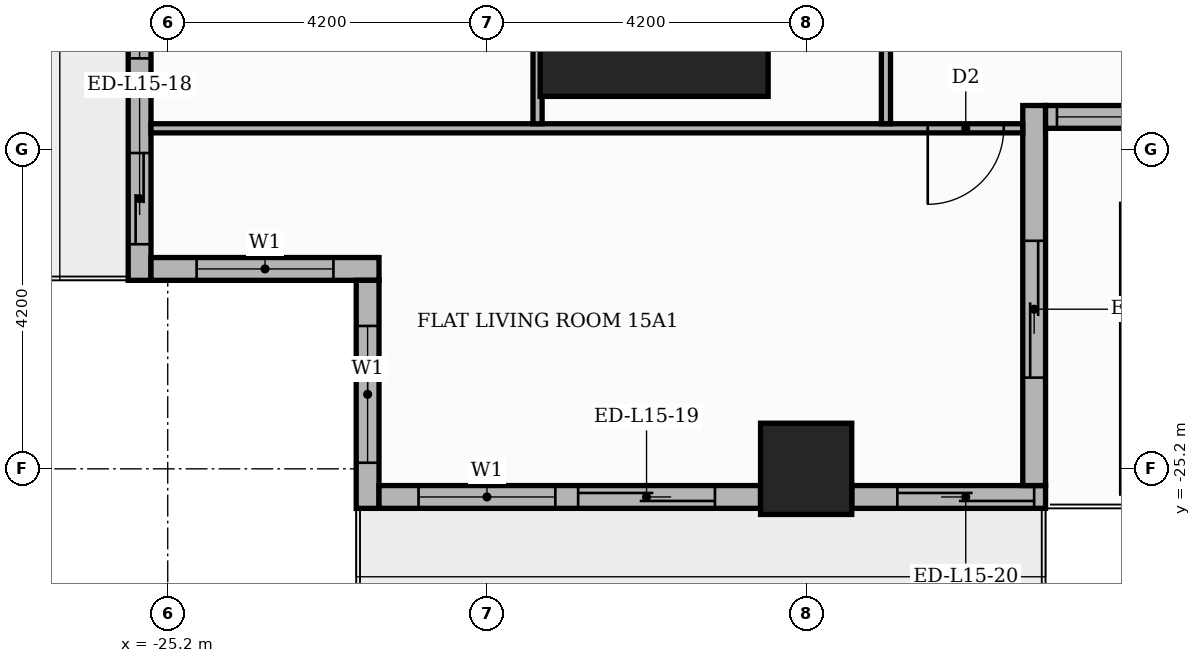
"""IFC4 building model, lengths in metres.
Left out: names, types, materials, properties, quantities, classifications, styles, units other than length and angle.
Written with IfcOpenShell. Run it as: python <this file> out.ifc"""

import sys

from ifc_helpers import new_model, si_unit, direction, frame, frame_2d, origin, origin_2d, place, context, subcontext, project, spatial, rectangle, extrude, element, fill, save


model = new_model("IFC4")
c1 = context("Model", 3, precision=1e-05, world=origin(), true_north=direction((0.0, 1.0)))
c2 = subcontext(c1, "Body", "Model", "MODEL_VIEW")
j1 = project(units=[si_unit("LENGTHUNIT", "METRE"), si_unit("PLANEANGLEUNIT", "RADIAN")], contexts=[c1])
p1 = place(None, origin())
s1 = spatial("IfcSite", under=j1, at=p1, CompositionType="ELEMENT")
p2 = place(p1, origin())
s2 = spatial("IfcBuilding", under=s1, at=p2, CompositionType="ELEMENT")
p3 = place(p2, frame((0.0, 0.0, 66.0)))
s3 = spatial("IfcBuildingStorey", under=s2, at=p3, CompositionType="ELEMENT", Elevation=66.0)
p4 = place(p3, frame((-18.8, -18.8, 0.0), z_axis=(0.0, 0.0, 1.0), x_axis=(1.0, 0.0, 0.0)))
e1 = element("IfcColumn", 1, at=p4, inside=s3, PredefinedType="COLUMN", context=c2, shape_type="SweptSolid", body=[
    extrude(rectangle(XDim=3.0, YDim=3.0, at=origin_2d()), origin(), (0.0, 0.0, 1.0), 3.9),
])
p5 = place(p3, frame((-16.8, -25.2, 0.0), z_axis=(0.0, 0.0, 1.0), x_axis=(1.0, 0.0, 0.0)))
e2 = element("IfcColumn", 2, at=p5, inside=s3, PredefinedType="COLUMN", context=c2, shape_type="SweptSolid", body=[
    extrude(rectangle(XDim=1.2, YDim=1.2, at=origin_2d()), origin(), (0.0, 0.0, 1.0), 3.9),
])
p6 = place(p3, frame((-25.57, -17.4, 0.0), z_axis=(0.0, 0.0, 1.0), x_axis=(0.0, -1.0, 0.0)))
e3 = element("IfcWall", 3, at=p6, inside=s3, PredefinedType="STANDARD", context=c2, shape_type="SweptSolid", body=[
    extrude(rectangle(XDim=5.32, YDim=0.3, at=frame_2d((2.66, 0.0))), origin(), (0.0, 0.0, 1.0), 3.48),
])
p7 = place(p6, frame((0.6, 0.0, 0.9)))
e4 = element("IfcOpeningElement", 4, at=p7, cuts=e3, PredefinedType="OPENING", context=c2, shape_type="SweptSolid", body=[
    extrude(rectangle(XDim=1.8, YDim=2.1, at=frame_2d((0.9, 1.05))), frame((0.0, 0.16, 0.0), z_axis=(0.0, -1.0, 0.0), x_axis=(1.0, 0.0, 0.0)), (0.0, 0.0, 1.0), 0.32),
])
p8 = place(p6, frame((3.645, 0.0, 0.0)))
e5 = element("IfcOpeningElement", 5, at=p8, cuts=e3, PredefinedType="OPENING", context=c2, shape_type="SweptSolid", body=[
    extrude(rectangle(XDim=1.2, YDim=2.4, at=frame_2d((0.6, 1.2))), frame((0.0, 0.16, 0.0), z_axis=(0.0, -1.0, 0.0), x_axis=(1.0, 0.0, 0.0)), (0.0, 0.0, 1.0), 0.32),
])
p9 = place(p3, frame((-25.42, -22.57, 0.0), z_axis=(0.0, 0.0, 1.0), x_axis=(1.0, 0.0, 0.0)))
e6 = element("IfcWall", 6, at=p9, inside=s3, PredefinedType="STANDARD", context=c2, shape_type="SweptSolid", body=[
    extrude(rectangle(XDim=3.0, YDim=0.3, at=frame_2d((1.5, 0.0))), origin(), (0.0, 0.0, 1.0), 3.48),
])
p10 = place(p9, frame((0.6, 0.0, 0.9)))
e7 = element("IfcOpeningElement", 7, at=p10, cuts=e6, PredefinedType="OPENING", context=c2, shape_type="SweptSolid", body=[
    extrude(rectangle(XDim=1.8, YDim=2.1, at=frame_2d((0.9, 1.05))), frame((0.0, 0.16, 0.0), z_axis=(0.0, -1.0, 0.0), x_axis=(1.0, 0.0, 0.0)), (0.0, 0.0, 1.0), 0.32),
])
p11 = place(p3, frame((-22.57, -22.72, 0.0), z_axis=(0.0, 0.0, 1.0), x_axis=(0.0, -1.0, 0.0)))
e8 = element("IfcWall", 8, at=p11, inside=s3, PredefinedType="STANDARD", context=c2, shape_type="SweptSolid", body=[
    extrude(rectangle(XDim=3.0, YDim=0.3, at=frame_2d((1.5, 0.0))), origin(), (0.0, 0.0, 1.0), 3.48),
])
p12 = place(p11, frame((0.6, 0.0, 0.9)))
e9 = element("IfcOpeningElement", 9, at=p12, cuts=e8, PredefinedType="OPENING", context=c2, shape_type="SweptSolid", body=[
    extrude(rectangle(XDim=1.8, YDim=2.1, at=frame_2d((0.9, 1.05))), frame((0.0, 0.16, 0.0), z_axis=(0.0, -1.0, 0.0), x_axis=(1.0, 0.0, 0.0)), (0.0, 0.0, 1.0), 0.32),
])
p13 = place(p3, frame((-22.42, -25.57, 0.0), z_axis=(0.0, 0.0, 1.0), x_axis=(1.0, 0.0, 0.0)))
e10 = element("IfcWall", 10, at=p13, inside=s3, PredefinedType="STANDARD", context=c2, shape_type="SweptSolid", body=[
    extrude(rectangle(XDim=5.02, YDim=0.3, at=frame_2d((2.51, 0.0))), origin(), (0.0, 0.0, 1.0), 3.48),
])
p14 = place(p13, frame((0.52, 0.0, 0.9)))
e11 = element("IfcOpeningElement", 11, at=p14, cuts=e10, PredefinedType="OPENING", context=c2, shape_type="SweptSolid", body=[
    extrude(rectangle(XDim=1.8, YDim=2.1, at=frame_2d((0.9, 1.05))), frame((0.0, 0.16, 0.0), z_axis=(0.0, -1.0, 0.0), x_axis=(1.0, 0.0, 0.0)), (0.0, 0.0, 1.0), 0.32),
])
p15 = place(p13, frame((2.62, 0.0, 0.0)))
e12 = element("IfcOpeningElement", 12, at=p15, cuts=e10, PredefinedType="OPENING", context=c2, shape_type="SweptSolid", body=[
    extrude(rectangle(XDim=1.8, YDim=2.4, at=frame_2d((0.9, 1.2))), frame((0.0, 0.16, 0.0), z_axis=(0.0, -1.0, 0.0), x_axis=(1.0, 0.0, 0.0)), (0.0, 0.0, 1.0), 0.32),
])
p16 = place(p3, frame((-16.2, -25.57, 0.0), z_axis=(0.0, 0.0, 1.0), x_axis=(1.0, 0.0, 0.0)))
e13 = element("IfcWall", 13, at=p16, inside=s3, PredefinedType="STANDARD", context=c2, shape_type="SweptSolid", body=[
    extrude(rectangle(XDim=2.55, YDim=0.3, at=frame_2d((1.275, 0.0))), origin(), (0.0, 0.0, 1.0), 3.48),
])
p17 = place(p16, frame((0.6, 0.0, 0.0)))
e14 = element("IfcOpeningElement", 14, at=p17, cuts=e13, PredefinedType="OPENING", context=c2, shape_type="SweptSolid", body=[
    extrude(rectangle(XDim=1.8, YDim=2.4, at=frame_2d((0.9, 1.2))), frame((0.0, 0.16, 0.0), z_axis=(0.0, -1.0, 0.0), x_axis=(1.0, 0.0, 0.0)), (0.0, 0.0, 1.0), 0.32),
])
p18 = place(p3, frame((-13.8, -25.42, 0.0), z_axis=(0.0, 0.0, 1.0), x_axis=(0.0, 1.0, 0.0)))
e15 = element("IfcWall", 15, at=p18, inside=s3, PredefinedType="STANDARD", context=c2, shape_type="SweptSolid", body=[
    extrude(rectangle(XDim=5.0, YDim=0.3, at=frame_2d((2.5, 0.0))), origin(), (0.0, 0.0, 1.0), 3.48),
])
p19 = place(p18, frame((1.42, 0.0, 0.0)))
e16 = element("IfcOpeningElement", 16, at=p19, cuts=e15, PredefinedType="OPENING", context=c2, shape_type="SweptSolid", body=[
    extrude(rectangle(XDim=1.8, YDim=2.4, at=frame_2d((0.9, 1.2))), frame((0.0, 0.16, 0.0), z_axis=(0.0, -1.0, 0.0), x_axis=(1.0, 0.0, 0.0)), (0.0, 0.0, 1.0), 0.32),
])
p20 = place(p3, frame((-13.65, -20.57, 0.0), z_axis=(0.0, 0.0, 1.0), x_axis=(1.0, 0.0, 0.0)))
e17 = element("IfcWall", 17, at=p20, inside=s3, PredefinedType="STANDARD", context=c2, shape_type="SweptSolid", body=[
    extrude(rectangle(XDim=27.6, YDim=0.3, at=frame_2d((13.8, 0.0))), origin(), (0.0, 0.0, 1.0), 3.48),
])
p21 = place(p20, frame((0.15, 0.0, 0.9)))
e18 = element("IfcOpeningElement", 18, at=p21, cuts=e17, PredefinedType="OPENING", context=c2, shape_type="SweptSolid", body=[
    extrude(rectangle(XDim=6.0, YDim=2.1, at=frame_2d((3.0, 1.05))), frame((0.0, 0.16, 0.0), z_axis=(0.0, -1.0, 0.0), x_axis=(1.0, 0.0, 0.0)), (0.0, 0.0, 1.0), 0.32),
])
p22 = place(p20, frame((6.45, 0.0, 0.9)))
e19 = element("IfcOpeningElement", 19, at=p22, cuts=e17, PredefinedType="OPENING", context=c2, shape_type="SweptSolid", body=[
    extrude(rectangle(XDim=1.8, YDim=2.1, at=frame_2d((0.9, 1.05))), frame((0.0, 0.16, 0.0), z_axis=(0.0, -1.0, 0.0), x_axis=(1.0, 0.0, 0.0)), (0.0, 0.0, 1.0), 0.32),
])
p23 = place(p20, frame((8.55, 0.0, 0.9)))
e20 = element("IfcOpeningElement", 20, at=p23, cuts=e17, PredefinedType="OPENING", context=c2, shape_type="SweptSolid", body=[
    extrude(rectangle(XDim=6.0, YDim=2.1, at=frame_2d((3.0, 1.05))), frame((0.0, 0.16, 0.0), z_axis=(0.0, -1.0, 0.0), x_axis=(1.0, 0.0, 0.0)), (0.0, 0.0, 1.0), 0.32),
])
p24 = place(p20, frame((14.85, 0.0, 0.9)))
e21 = element("IfcOpeningElement", 21, at=p24, cuts=e17, PredefinedType="OPENING", context=c2, shape_type="SweptSolid", body=[
    extrude(rectangle(XDim=6.0, YDim=2.1, at=frame_2d((3.0, 1.05))), frame((0.0, 0.16, 0.0), z_axis=(0.0, -1.0, 0.0), x_axis=(1.0, 0.0, 0.0)), (0.0, 0.0, 1.0), 0.32),
])
p25 = place(p20, frame((21.15, 0.0, 0.9)))
e22 = element("IfcOpeningElement", 22, at=p25, cuts=e17, PredefinedType="OPENING", context=c2, shape_type="SweptSolid", body=[
    extrude(rectangle(XDim=6.0, YDim=2.1, at=frame_2d((3.0, 1.05))), frame((0.0, 0.16, 0.0), z_axis=(0.0, -1.0, 0.0), x_axis=(1.0, 0.0, 0.0)), (0.0, 0.0, 1.0), 0.32),
])
p26 = place(p3, frame((-25.42, -20.72, 0.0), z_axis=(0.0, 0.0, 1.0), x_axis=(1.0, 0.0, 0.0)))
e23 = element("IfcWall", 23, at=p26, inside=s3, PredefinedType="PARTITIONING", context=c2, shape_type="SweptSolid", body=[
    extrude(rectangle(XDim=11.47, YDim=0.12, at=frame_2d((5.735, 0.0))), origin(), (0.0, 0.0, 1.0), 3.48),
])
p27 = place(p26, frame((10.22, 0.0, 0.0)))
e24 = element("IfcOpeningElement", 24, at=p27, cuts=e23, PredefinedType="OPENING", context=c2, shape_type="SweptSolid", body=[
    extrude(rectangle(XDim=1.0, YDim=2.1, at=frame_2d((0.5, 1.05))), frame((0.0, 0.07, 0.0), z_axis=(0.0, -1.0, 0.0), x_axis=(1.0, 0.0, 0.0)), (0.0, 0.0, 1.0), 0.14),
])
p28 = place(p3, frame((-20.334, -20.66, 0.0), z_axis=(0.0, 0.0, 1.0), x_axis=(0.0, 1.0, 0.0)))
e25 = element("IfcWall", 25, at=p28, inside=s3, PredefinedType="PARTITIONING", context=c2, shape_type="SweptSolid", body=[
    extrude(rectangle(XDim=6.91, YDim=0.12, at=frame_2d((3.455, 0.0))), origin(), (0.0, 0.0, 1.0), 3.48),
])
p29 = place(p28, frame((4.792, 0.0, 0.0)))
e26 = element("IfcOpeningElement", 26, at=p29, cuts=e25, PredefinedType="OPENING", context=c2, shape_type="SweptSolid", body=[
    extrude(rectangle(XDim=0.9, YDim=2.1, at=frame_2d((0.45, 1.05))), frame((0.0, 0.07, 0.0), z_axis=(0.0, -1.0, 0.0), x_axis=(1.0, 0.0, 0.0)), (0.0, 0.0, 1.0), 0.14),
])
p30 = place(p3, frame((-15.75, -20.66, 0.0), z_axis=(0.0, 0.0, 1.0), x_axis=(0.0, 1.0, 0.0)))
e27 = element("IfcWall", 27, at=p30, inside=s3, PredefinedType="PARTITIONING", context=c2, shape_type="SweptSolid", body=[
    extrude(rectangle(XDim=6.91, YDim=0.12, at=frame_2d((3.455, 0.0))), origin(), (0.0, 0.0, 1.0), 3.48),
])
p31 = place(p30, frame((2.975, 0.0, 0.0)))
e28 = element("IfcOpeningElement", 28, at=p31, cuts=e27, PredefinedType="OPENING", context=c2, shape_type="SweptSolid", body=[
    extrude(rectangle(XDim=1.0, YDim=2.1, at=frame_2d((0.5, 1.05))), frame((0.0, 0.07, 0.0), z_axis=(0.0, -1.0, 0.0), x_axis=(1.0, 0.0, 0.0)), (0.0, 0.0, 1.0), 0.14),
])
p32 = place(p7, origin())
e29 = element("IfcWindow", 29, at=p32, inside=s3, PartitioningType="SINGLE_PANEL", PredefinedType="WINDOW", context=c2, shape_type="SweptSolid", body=[
    extrude(rectangle(XDim=1.8, YDim=2.1, at=frame_2d((0.9, 1.05))), frame((0.0, 0.03, 0.0), z_axis=(0.0, -1.0, 0.0), x_axis=(1.0, 0.0, 0.0)), (0.0, 0.0, 1.0), 0.06),
])
fill(e4, e29)
p33 = place(p8, origin())
e30 = element("IfcDoor", 30, at=p33, inside=s3, OperationType="SLIDING_TO_RIGHT", PredefinedType="DOOR", context=c2, shape_type="SweptSolid", body=[
    extrude(rectangle(XDim=1.2, YDim=2.4, at=frame_2d((0.6, 1.2))), frame((0.0, 0.025, 0.0), z_axis=(0.0, -1.0, 0.0), x_axis=(1.0, 0.0, 0.0)), (0.0, 0.0, 1.0), 0.05),
])
fill(e5, e30)
p34 = place(p10, origin())
e31 = element("IfcWindow", 31, at=p34, inside=s3, PartitioningType="SINGLE_PANEL", PredefinedType="WINDOW", context=c2, shape_type="SweptSolid", body=[
    extrude(rectangle(XDim=1.8, YDim=2.1, at=frame_2d((0.9, 1.05))), frame((0.0, 0.03, 0.0), z_axis=(0.0, -1.0, 0.0), x_axis=(1.0, 0.0, 0.0)), (0.0, 0.0, 1.0), 0.06),
])
fill(e7, e31)
p35 = place(p12, origin())
e32 = element("IfcWindow", 32, at=p35, inside=s3, PartitioningType="SINGLE_PANEL", PredefinedType="WINDOW", context=c2, shape_type="SweptSolid", body=[
    extrude(rectangle(XDim=1.8, YDim=2.1, at=frame_2d((0.9, 1.05))), frame((0.0, 0.03, 0.0), z_axis=(0.0, -1.0, 0.0), x_axis=(1.0, 0.0, 0.0)), (0.0, 0.0, 1.0), 0.06),
])
fill(e9, e32)
p36 = place(p14, origin())
e33 = element("IfcWindow", 33, at=p36, inside=s3, PartitioningType="SINGLE_PANEL", PredefinedType="WINDOW", context=c2, shape_type="SweptSolid", body=[
    extrude(rectangle(XDim=1.8, YDim=2.1, at=frame_2d((0.9, 1.05))), frame((0.0, 0.03, 0.0), z_axis=(0.0, -1.0, 0.0), x_axis=(1.0, 0.0, 0.0)), (0.0, 0.0, 1.0), 0.06),
])
fill(e11, e33)
p37 = place(p15, origin())
e34 = element("IfcDoor", 34, at=p37, inside=s3, OperationType="SLIDING_TO_RIGHT", PredefinedType="DOOR", context=c2, shape_type="SweptSolid", body=[
    extrude(rectangle(XDim=1.8, YDim=2.4, at=frame_2d((0.9, 1.2))), frame((0.0, 0.025, 0.0), z_axis=(0.0, -1.0, 0.0), x_axis=(1.0, 0.0, 0.0)), (0.0, 0.0, 1.0), 0.05),
])
fill(e12, e34)
p38 = place(p17, origin())
e35 = element("IfcDoor", 35, at=p38, inside=s3, OperationType="SLIDING_TO_LEFT", PredefinedType="DOOR", context=c2, shape_type="SweptSolid", body=[
    extrude(rectangle(XDim=1.8, YDim=2.4, at=frame_2d((0.9, 1.2))), frame((0.0, 0.025, 0.0), z_axis=(0.0, -1.0, 0.0), x_axis=(1.0, 0.0, 0.0)), (0.0, 0.0, 1.0), 0.05),
])
fill(e14, e35)
p39 = place(p19, origin())
e36 = element("IfcDoor", 36, at=p39, inside=s3, OperationType="SLIDING_TO_LEFT", PredefinedType="DOOR", context=c2, shape_type="SweptSolid", body=[
    extrude(rectangle(XDim=1.8, YDim=2.4, at=frame_2d((0.9, 1.2))), frame((0.0, 0.025, 0.0), z_axis=(0.0, -1.0, 0.0), x_axis=(1.0, 0.0, 0.0)), (0.0, 0.0, 1.0), 0.05),
])
fill(e16, e36)
p40 = place(p21, origin())
e37 = element("IfcWindow", 37, at=p40, inside=s3, PartitioningType="SINGLE_PANEL", PredefinedType="WINDOW", context=c2, shape_type="SweptSolid", body=[
    extrude(rectangle(XDim=6.0, YDim=2.1, at=frame_2d((3.0, 1.05))), frame((0.0, 0.03, 0.0), z_axis=(0.0, -1.0, 0.0), x_axis=(1.0, 0.0, 0.0)), (0.0, 0.0, 1.0), 0.06),
])
fill(e18, e37)
p41 = place(p27, frame((1.0, 0.0, 0.0), z_axis=(0.0, 0.0, 1.0), x_axis=(-1.0, 0.0, 0.0)))
e38 = element("IfcDoor", 38, at=p41, inside=s3, OperationType="SINGLE_SWING_LEFT", PredefinedType="DOOR", context=c2, shape_type="SweptSolid", body=[
    extrude(rectangle(XDim=1.0, YDim=2.1, at=frame_2d((0.5, 1.05))), frame((0.0, 0.025, 0.0), z_axis=(0.0, -1.0, 0.0), x_axis=(1.0, 0.0, 0.0)), (0.0, 0.0, 1.0), 0.05),
])
fill(e24, e38)
save(model, sys.argv[1])
